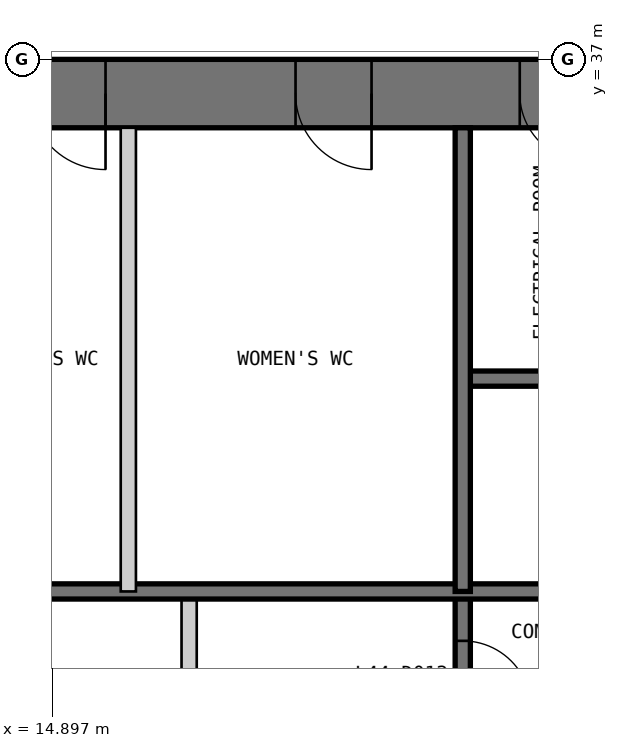
"""IFC4 building model, lengths in metres.
Left out: names, types, materials, properties, quantities, classifications, styles, units other than length and angle.
Written with IfcOpenShell. Run it as: python <this file> out.ifc"""

import sys

from ifc_helpers import new_model, si_unit, direction, frame, frame_2d, origin, place, context, subcontext, project, spatial, polyline, rectangle, outline, extrude, element, fill, save


model = new_model("IFC4")
c1 = context("Model", 3, precision=1e-05, world=origin(), true_north=direction((0.0, 1.0)))
c2 = subcontext(c1, "Body", "Model", "MODEL_VIEW")
j1 = project(units=[si_unit("LENGTHUNIT", "METRE"), si_unit("PLANEANGLEUNIT", "RADIAN")], contexts=[c1])
p1 = place(None, origin())
s1 = spatial("IfcSite", under=j1, at=p1, CompositionType="ELEMENT")
p2 = place(p1, origin())
s2 = spatial("IfcBuilding", under=s1, at=p2, CompositionType="ELEMENT")
p3 = place(p2, frame((0.0, 0.0, 189.8)))
s3 = spatial("IfcBuildingStorey", under=s2, at=p3, CompositionType="ELEMENT", Elevation=189.8)
p4 = place(p3, frame((37.0, 36.55, 0.0), z_axis=(0.0, 0.0, 1.0), x_axis=(-1.0, 0.0, 0.0)))
e1 = element("IfcWall", 1, at=p4, inside=s3, PredefinedType="SHEAR", context=c2, shape_type="SweptSolid", body=[
    extrude(outline(polyline([(0.0, -0.45), (24.0, -0.45), (23.1, 0.45), (0.9, 0.45), (0.0, -0.45)])), origin(), (0.0, 0.0, 1.0), 4.0),
])
p5 = place(p4, frame((4.9, 0.0, 0.0)))
e2 = element("IfcOpeningElement", 2, at=p5, cuts=e1, PredefinedType="OPENING", context=c2, shape_type="SweptSolid", body=[
    extrude(rectangle(XDim=1.0, YDim=2.2, at=frame_2d((0.5, 1.1))), frame((0.0, 0.46, 0.0), z_axis=(0.0, -1.0, 0.0), x_axis=(1.0, 0.0, 0.0)), (0.0, 0.0, 1.0), 0.92),
])
p6 = place(p4, frame((8.9, 0.0, 0.0)))
e3 = element("IfcOpeningElement", 3, at=p6, cuts=e1, PredefinedType="OPENING", context=c2, shape_type="SweptSolid", body=[
    extrude(rectangle(XDim=1.1, YDim=2.2, at=frame_2d((0.55, 1.1))), frame((0.0, 0.46, 0.0), z_axis=(0.0, -1.0, 0.0), x_axis=(1.0, 0.0, 0.0)), (0.0, 0.0, 1.0), 0.92),
])
p7 = place(p4, frame((15.05, 0.0, 0.0)))
e4 = element("IfcOpeningElement", 4, at=p7, cuts=e1, PredefinedType="OPENING", context=c2, shape_type="SweptSolid", body=[
    extrude(rectangle(XDim=0.9, YDim=2.2, at=frame_2d((0.45, 1.1))), frame((0.0, 0.46, 0.0), z_axis=(0.0, -1.0, 0.0), x_axis=(1.0, 0.0, 0.0)), (0.0, 0.0, 1.0), 0.92),
])
p8 = place(p4, frame((17.9, 0.0, 0.0)))
e5 = element("IfcOpeningElement", 5, at=p8, cuts=e1, PredefinedType="OPENING", context=c2, shape_type="SweptSolid", body=[
    extrude(rectangle(XDim=1.0, YDim=2.2, at=frame_2d((0.5, 1.1))), frame((0.0, 0.46, 0.0), z_axis=(0.0, -1.0, 0.0), x_axis=(1.0, 0.0, 0.0)), (0.0, 0.0, 1.0), 0.92),
])
p9 = place(p4, frame((21.4, 0.0, 0.0)))
e6 = element("IfcOpeningElement", 6, at=p9, cuts=e1, PredefinedType="OPENING", context=c2, shape_type="SweptSolid", body=[
    extrude(rectangle(XDim=1.0, YDim=2.2, at=frame_2d((0.5, 1.1))), frame((0.0, 0.46, 0.0), z_axis=(0.0, -1.0, 0.0), x_axis=(1.0, 0.0, 0.0)), (0.0, 0.0, 1.0), 0.92),
])
p10 = place(p3, frame((16.7, 13.9, 0.0), z_axis=(0.0, 0.0, 1.0), x_axis=(0.0, 1.0, 0.0)))
e7 = element("IfcWall", 7, at=p10, inside=s3, PredefinedType="PARTITIONING", context=c2, shape_type="SweptSolid", body=[
    extrude(rectangle(XDim=16.1, YDim=0.2, at=frame_2d((8.05, 0.0))), origin(), (0.0, 0.0, 1.0), 3.8),
])
p11 = place(p10, frame((7.95, 0.0, 0.0)))
e8 = element("IfcOpeningElement", 8, at=p11, cuts=e7, PredefinedType="OPENING", context=c2, shape_type="SweptSolid", body=[
    extrude(rectangle(XDim=0.9, YDim=2.2, at=frame_2d((0.45, 1.1))), frame((0.0, 0.11, 0.0), z_axis=(0.0, -1.0, 0.0), x_axis=(1.0, 0.0, 0.0)), (0.0, 0.0, 1.0), 0.22),
])
p12 = place(p10, frame((12.9, 0.0, 0.0)))
e9 = element("IfcOpeningElement", 9, at=p12, cuts=e7, PredefinedType="OPENING", context=c2, shape_type="SweptSolid", body=[
    extrude(rectangle(XDim=0.9, YDim=2.2, at=frame_2d((0.45, 1.1))), frame((0.0, 0.11, 0.0), z_axis=(0.0, -1.0, 0.0), x_axis=(1.0, 0.0, 0.0)), (0.0, 0.0, 1.0), 0.22),
])
p13 = place(p3, frame((20.3, 13.9, 0.0), z_axis=(0.0, 0.0, 1.0), x_axis=(0.0, 1.0, 0.0)))
e10 = element("IfcWall", 10, at=p13, inside=s3, PredefinedType="SOLIDWALL", context=c2, shape_type="SweptSolid", body=[
    extrude(rectangle(XDim=16.1, YDim=0.2, at=frame_2d((8.05, 0.0))), origin(), (0.0, 0.0, 1.0), 3.8),
])
p14 = place(p13, frame((7.85, 0.0, 0.0)))
e11 = element("IfcOpeningElement", 11, at=p14, cuts=e10, PredefinedType="OPENING", context=c2, shape_type="SweptSolid", body=[
    extrude(rectangle(XDim=0.9, YDim=2.2, at=frame_2d((0.45, 1.1))), frame((0.0, 0.11, 0.0), z_axis=(0.0, -1.0, 0.0), x_axis=(1.0, 0.0, 0.0)), (0.0, 0.0, 1.0), 0.22),
])
p15 = place(p13, frame((11.75, 0.0, 0.0)))
e12 = element("IfcOpeningElement", 12, at=p15, cuts=e10, PredefinedType="OPENING", context=c2, shape_type="SweptSolid", body=[
    extrude(rectangle(XDim=0.9, YDim=2.2, at=frame_2d((0.45, 1.1))), frame((0.0, 0.11, 0.0), z_axis=(0.0, -1.0, 0.0), x_axis=(1.0, 0.0, 0.0)), (0.0, 0.0, 1.0), 0.22),
])
p16 = place(p13, frame((14.55, 0.0, 0.0)))
e13 = element("IfcOpeningElement", 13, at=p16, cuts=e10, PredefinedType="OPENING", context=c2, shape_type="SweptSolid", body=[
    extrude(rectangle(XDim=0.9, YDim=2.2, at=frame_2d((0.45, 1.1))), frame((0.0, 0.11, 0.0), z_axis=(0.0, -1.0, 0.0), x_axis=(1.0, 0.0, 0.0)), (0.0, 0.0, 1.0), 0.22),
])
p17 = place(p3, frame((29.7, 32.8, 0.0), z_axis=(0.0, 0.0, 1.0), x_axis=(-1.0, 0.0, 0.0)))
e14 = element("IfcWall", 14, at=p17, inside=s3, PredefinedType="SOLIDWALL", context=c2, shape_type="SweptSolid", body=[
    extrude(rectangle(XDim=9.4, YDim=0.2, at=frame_2d((4.7, 0.0))), origin(), (0.0, 0.0, 1.0), 3.8),
])
p18 = place(p17, frame((0.25, 0.0, 0.0)))
e15 = element("IfcOpeningElement", 15, at=p18, cuts=e14, PredefinedType="OPENING", context=c2, shape_type="SweptSolid", body=[
    extrude(rectangle(XDim=1.0, YDim=2.2, at=frame_2d((0.5, 1.1))), frame((0.0, 0.11, 0.0), z_axis=(0.0, -1.0, 0.0), x_axis=(1.0, 0.0, 0.0)), (0.0, 0.0, 1.0), 0.22),
])
p19 = place(p3, frame((29.7, 30.0, 0.0), z_axis=(0.0, 0.0, 1.0), x_axis=(-1.0, 0.0, 0.0)))
e16 = element("IfcWall", 16, at=p19, inside=s3, PredefinedType="SOLIDWALL", context=c2, shape_type="SweptSolid", body=[
    extrude(rectangle(XDim=15.8, YDim=0.2, at=frame_2d((7.9, 0.0))), origin(), (0.0, 0.0, 1.0), 3.8),
])
p20 = place(p3, frame((20.3, 36.1, 0.0), z_axis=(0.0, 0.0, 1.0), x_axis=(0.0, -1.0, 0.0)))
e17 = element("IfcWall", 17, at=p20, inside=s3, PredefinedType="SOLIDWALL", context=c2, shape_type="SweptSolid", body=[
    extrude(rectangle(XDim=6.1, YDim=0.2, at=frame_2d((3.05, 0.0))), origin(), (0.0, 0.0, 1.0), 3.8),
])
p21 = place(p3, frame((15.9, 36.1, 0.0), z_axis=(0.0, 0.0, 1.0), x_axis=(0.0, -1.0, 0.0)))
e18 = element("IfcWall", 18, at=p21, inside=s3, PredefinedType="PARTITIONING", context=c2, shape_type="SweptSolid", body=[
    extrude(rectangle(XDim=6.1, YDim=0.2, at=frame_2d((3.05, 0.0))), origin(), (0.0, 0.0, 1.0), 3.8),
])
p22 = place(p16, frame((0.9, 0.0, 0.0), z_axis=(0.0, 0.0, 1.0), x_axis=(-1.0, 0.0, 0.0)))
e19 = element("IfcDoor", 19, at=p22, inside=s3, OperationType="SINGLE_SWING_RIGHT", PredefinedType="DOOR", context=c2, shape_type="SweptSolid", body=[
    extrude(rectangle(XDim=0.9, YDim=2.2, at=frame_2d((0.45, 1.1))), frame((0.0, 0.025, 0.0), z_axis=(0.0, -1.0, 0.0), x_axis=(1.0, 0.0, 0.0)), (0.0, 0.0, 1.0), 0.05),
])
fill(e13, e19)
p23 = place(p7, origin())
e20 = element("IfcDoor", 20, at=p23, inside=s3, OperationType="SINGLE_SWING_LEFT", PredefinedType="DOOR", context=c2, shape_type="SweptSolid", body=[
    extrude(rectangle(XDim=0.9, YDim=2.2, at=frame_2d((0.45, 1.1))), frame((0.0, 0.025, 0.0), z_axis=(0.0, -1.0, 0.0), x_axis=(1.0, 0.0, 0.0)), (0.0, 0.0, 1.0), 0.05),
    extrude(outline(polyline([(0.0, 0.0), (0.04, 0.0), (0.04, 2.16), (0.86, 2.16), (0.86, 0.0), (0.9, 0.0), (0.9, 2.2), (0.0, 2.2), (0.0, 0.0)])), frame((0.0, 0.3, 0.0), z_axis=(0.0, -1.0, 0.0), x_axis=(1.0, 0.0, 0.0)), (0.0, 0.0, 1.0), 0.6),
])
fill(e4, e20)
p24 = place(p8, origin())
e21 = element("IfcDoor", 21, at=p24, inside=s3, OperationType="SINGLE_SWING_LEFT", PredefinedType="DOOR", context=c2, shape_type="SweptSolid", body=[
    extrude(rectangle(XDim=1.0, YDim=2.2, at=frame_2d((0.5, 1.1))), frame((0.0, 0.025, 0.0), z_axis=(0.0, -1.0, 0.0), x_axis=(1.0, 0.0, 0.0)), (0.0, 0.0, 1.0), 0.05),
    extrude(outline(polyline([(0.0, 0.0), (0.04, 0.0), (0.04, 2.16), (0.96, 2.16), (0.96, 0.0), (1.0, 0.0), (1.0, 2.2), (0.0, 2.2), (0.0, 0.0)])), frame((0.0, 0.3, 0.0), z_axis=(0.0, -1.0, 0.0), x_axis=(1.0, 0.0, 0.0)), (0.0, 0.0, 1.0), 0.6),
])
fill(e5, e21)
p25 = place(p9, origin())
e22 = element("IfcDoor", 22, at=p25, inside=s3, OperationType="SINGLE_SWING_LEFT", PredefinedType="DOOR", context=c2, shape_type="SweptSolid", body=[
    extrude(rectangle(XDim=1.0, YDim=2.2, at=frame_2d((0.5, 1.1))), frame((0.0, 0.025, 0.0), z_axis=(0.0, -1.0, 0.0), x_axis=(1.0, 0.0, 0.0)), (0.0, 0.0, 1.0), 0.05),
    extrude(outline(polyline([(0.0, 0.0), (0.04, 0.0), (0.04, 2.16), (0.96, 2.16), (0.96, 0.0), (1.0, 0.0), (1.0, 2.2), (0.0, 2.2), (0.0, 0.0)])), frame((0.0, 0.3, 0.0), z_axis=(0.0, -1.0, 0.0), x_axis=(1.0, 0.0, 0.0)), (0.0, 0.0, 1.0), 0.6),
])
fill(e6, e22)
save(model, sys.argv[1])
